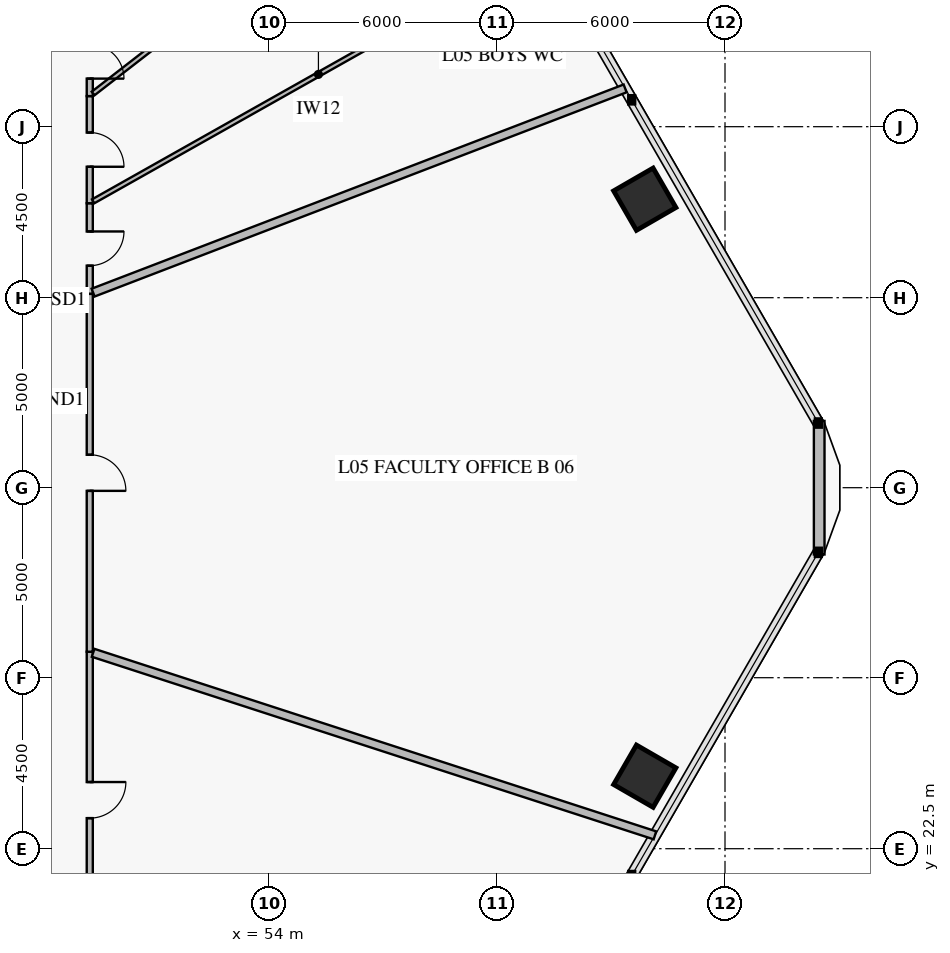
"""IFC4 building model, lengths in metres.
Left out: names, types, materials, properties, quantities, classifications, styles, units other than length and angle.
Written with IfcOpenShell. Run it as: python <this file> out.ifc"""

import sys

from ifc_helpers import new_model, si_unit, direction, frame, frame_2d, origin, origin_2d, place, context, subcontext, project, spatial, rectangle, extrude, element, fill, save


model = new_model("IFC4")
c1 = context("Model", 3, precision=1e-05, world=origin(), true_north=direction((0.0, 1.0)))
c2 = subcontext(c1, "Body", "Model", "MODEL_VIEW")
j1 = project(units=[si_unit("LENGTHUNIT", "METRE"), si_unit("PLANEANGLEUNIT", "RADIAN")], contexts=[c1])
p1 = place(None, origin())
s1 = spatial("IfcSite", under=j1, at=p1, CompositionType="ELEMENT")
p2 = place(p1, origin())
s2 = spatial("IfcBuilding", under=s1, at=p2, CompositionType="ELEMENT")
p3 = place(p2, frame((0.0, 0.0, 20.4)))
s3 = spatial("IfcBuildingStorey", under=s2, at=p3, CompositionType="ELEMENT", Elevation=20.4)
for number, where, z_axis, x_axis in (
    (1, (63.889, 39.592, 0.0), (0.0, 0.0, 1.0), (-0.5, 0.866, 0.0)),
    (2, (63.889, 24.408, 0.0), (0.0, 0.0, 1.0), (0.5, 0.866, 0.0)),
):
    element("IfcColumn", number, at=place(p3, frame(where, z_axis=z_axis, x_axis=x_axis)), inside=s3, PredefinedType="COLUMN", context=c2, shape_type="SweptSolid", body=[
        extrude(rectangle(XDim=1.2, YDim=1.2, at=origin_2d()), origin(), (0.0, 0.0, 1.0), 3.92),
    ])
p4 = place(p3, frame((68.479, 33.758, 0.0), z_axis=(0.0, 0.0, 1.0), x_axis=(0.0, -1.0, 0.0)))
e3 = element("IfcWall", 3, at=p4, inside=s3, PredefinedType="SOLIDWALL", context=c2, shape_type="SweptSolid", body=[
    extrude(rectangle(XDim=3.515, YDim=0.28, at=frame_2d((1.758, 0.0))), origin(), (0.0, 0.0, 1.0), 3.92),
])
p5 = place(p3, frame((49.285, 37.1, 0.0), z_axis=(0.0, 0.0, 1.0), x_axis=(0.0, 1.0, 0.0)))
e4 = element("IfcWall", 4, at=p5, inside=s3, PredefinedType="PARTITIONING", context=c2, shape_type="SweptSolid", body=[
    extrude(rectangle(XDim=2.386, YDim=0.16, at=frame_2d((1.193, 0.0))), origin(), (0.0, 0.0, 1.0), 3.92),
])
p6 = place(p5, frame((0.743, 0.0, 0.0)))
e5 = element("IfcOpeningElement", 5, at=p6, cuts=e4, PredefinedType="OPENING", context=c2, shape_type="SweptSolid", body=[
    extrude(rectangle(XDim=0.9, YDim=2.1, at=frame_2d((0.45, 1.05))), frame((0.0, 0.092, 0.0), z_axis=(0.0, -1.0, 0.0), x_axis=(1.0, 0.0, 0.0)), (0.0, 0.0, 1.0), 0.184),
])
p7 = place(p3, frame((49.285, 39.486, 0.0), z_axis=(0.0, 0.0, 1.0), x_axis=(0.0, 1.0, 0.0)))
e6 = element("IfcWall", 6, at=p7, inside=s3, PredefinedType="PARTITIONING", context=c2, shape_type="SweptSolid", body=[
    extrude(rectangle(XDim=2.819, YDim=0.16, at=frame_2d((1.41, 0.0))), origin(), (0.0, 0.0, 1.0), 3.92),
])
p8 = place(p7, frame((0.96, 0.0, 0.0)))
e7 = element("IfcOpeningElement", 7, at=p8, cuts=e6, PredefinedType="OPENING", context=c2, shape_type="SweptSolid", body=[
    extrude(rectangle(XDim=0.9, YDim=2.1, at=frame_2d((0.45, 1.05))), frame((0.0, 0.092, 0.0), z_axis=(0.0, -1.0, 0.0), x_axis=(1.0, 0.0, 0.0)), (0.0, 0.0, 1.0), 0.184),
])
p9 = place(p3, frame((49.285, 42.305, 0.0), z_axis=(0.0, 0.0, 1.0), x_axis=(0.0, 1.0, 0.0)))
e8 = element("IfcWall", 8, at=p9, inside=s3, PredefinedType="PARTITIONING", context=c2, shape_type="SweptSolid", body=[
    extrude(rectangle(XDim=1.82, YDim=0.16, at=frame_2d((0.91, 0.0))), origin(), (0.0, 0.0, 1.0), 3.92),
])
p10 = place(p9, frame((0.46, 0.0, 0.0)))
e9 = element("IfcOpeningElement", 9, at=p10, cuts=e8, PredefinedType="OPENING", context=c2, shape_type="SweptSolid", body=[
    extrude(rectangle(XDim=0.9, YDim=2.1, at=frame_2d((0.45, 1.05))), frame((0.0, 0.092, 0.0), z_axis=(0.0, -1.0, 0.0), x_axis=(1.0, 0.0, 0.0)), (0.0, 0.0, 1.0), 0.184),
])
p11 = place(p3, frame((49.285, 19.875, 0.0), z_axis=(0.0, 0.0, 1.0), x_axis=(0.0, 1.0, 0.0)))
e10 = element("IfcWall", 10, at=p11, inside=s3, PredefinedType="PARTITIONING", context=c2, shape_type="SweptSolid", body=[
    extrude(rectangle(XDim=7.808, YDim=0.16, at=frame_2d((3.904, 0.0))), origin(), (0.0, 0.0, 1.0), 3.92),
])
p12 = place(p11, frame((3.429, 0.0, 0.0)))
e11 = element("IfcOpeningElement", 11, at=p12, cuts=e10, PredefinedType="OPENING", context=c2, shape_type="SweptSolid", body=[
    extrude(rectangle(XDim=0.95, YDim=2.1, at=frame_2d((0.475, 1.05))), frame((0.0, 0.092, 0.0), z_axis=(0.0, -1.0, 0.0), x_axis=(1.0, 0.0, 0.0)), (0.0, 0.0, 1.0), 0.184),
])
p13 = place(p3, frame((49.285, 27.683, 0.0), z_axis=(0.0, 0.0, 1.0), x_axis=(0.0, 1.0, 0.0)))
e12 = element("IfcWall", 12, at=p13, inside=s3, PredefinedType="PARTITIONING", context=c2, shape_type="SweptSolid", body=[
    extrude(rectangle(XDim=9.416, YDim=0.16, at=frame_2d((4.708, 0.0))), origin(), (0.0, 0.0, 1.0), 3.22),
])
p14 = place(p13, frame((4.233, 0.0, 0.0)))
e13 = element("IfcOpeningElement", 13, at=p14, cuts=e12, PredefinedType="OPENING", context=c2, shape_type="SweptSolid", body=[
    extrude(rectangle(XDim=0.95, YDim=2.1, at=frame_2d((0.475, 1.05))), frame((0.0, 0.092, 0.0), z_axis=(0.0, -1.0, 0.0), x_axis=(1.0, 0.0, 0.0)), (0.0, 0.0, 1.0), 0.184),
])
p15 = place(p3, frame((49.373, 37.134, 0.0), z_axis=(0.0, 0.0, 1.0), x_axis=(0.933584586871, 0.358357111214, 0.0)))
e14 = element("IfcWall", 14, at=p15, inside=s3, PredefinedType="PARTITIONING", context=c2, shape_type="SweptSolid", body=[
    extrude(rectangle(XDim=14.995, YDim=0.22, at=frame_2d((7.498, 0.0))), origin(), (0.0, 0.0, 1.0), 3.17),
])
p16 = place(p3, frame((49.373, 39.535, 0.0), z_axis=(0.0, 0.0, 1.0), x_axis=(0.871218886354, 0.490894746417, 0.0)))
e15 = element("IfcWall", 15, at=p16, inside=s3, PredefinedType="PARTITIONING", context=c2, shape_type="SweptSolid", body=[
    extrude(rectangle(XDim=13.61, YDim=0.12, at=frame_2d((6.805, 0.0))), origin(), (0.0, 0.0, 1.0), 3.17),
])
p17 = place(p3, frame((49.373, 42.373, 0.0), z_axis=(0.0, 0.0, 1.0), x_axis=(0.790162754328, 0.612897072658, 0.0)))
e16 = element("IfcWall", 16, at=p17, inside=s3, PredefinedType="PARTITIONING", context=c2, shape_type="SweptSolid", body=[
    extrude(rectangle(XDim=4.991, YDim=0.12, at=frame_2d((2.496, 0.0))), origin(), (0.0, 0.0, 1.0), 3.47),
])
p18 = place(p3, frame((49.373, 27.655, 0.0), z_axis=(0.0, 0.0, 1.0), x_axis=(0.951055880984, -0.309018949654, 0.0)))
e17 = element("IfcWall", 17, at=p18, inside=s3, PredefinedType="PARTITIONING", context=c2, shape_type="SweptSolid", body=[
    extrude(rectangle(XDim=15.544, YDim=0.22, at=frame_2d((7.772, 0.0))), origin(), (0.0, 0.0, 1.0), 3.17),
])
p19 = place(p6, frame((0.9, 0.0, 0.0), z_axis=(0.0, 0.0, 1.0), x_axis=(-1.0, 0.0, 0.0)))
e18 = element("IfcDoor", 18, at=p19, inside=s3, OperationType="SINGLE_SWING_LEFT", PredefinedType="DOOR", context=c2, shape_type="SweptSolid", body=[
    extrude(rectangle(XDim=0.9, YDim=2.1, at=frame_2d((0.45, 1.05))), frame((0.0, 0.025, 0.0), z_axis=(0.0, -1.0, 0.0), x_axis=(1.0, 0.0, 0.0)), (0.0, 0.0, 1.0), 0.05),
])
fill(e5, e18)
p20 = place(p8, frame((0.9, 0.0, 0.0), z_axis=(0.0, 0.0, 1.0), x_axis=(-1.0, 0.0, 0.0)))
e19 = element("IfcDoor", 19, at=p20, inside=s3, OperationType="SINGLE_SWING_RIGHT", PredefinedType="DOOR", context=c2, shape_type="SweptSolid", body=[
    extrude(rectangle(XDim=0.9, YDim=2.1, at=frame_2d((0.45, 1.05))), frame((0.0, 0.025, 0.0), z_axis=(0.0, -1.0, 0.0), x_axis=(1.0, 0.0, 0.0)), (0.0, 0.0, 1.0), 0.05),
])
fill(e7, e19)
p21 = place(p10, frame((0.9, 0.0, 0.0), z_axis=(0.0, 0.0, 1.0), x_axis=(-1.0, 0.0, 0.0)))
e20 = element("IfcDoor", 20, at=p21, inside=s3, OperationType="SINGLE_SWING_RIGHT", PredefinedType="DOOR", context=c2, shape_type="SweptSolid", body=[
    extrude(rectangle(XDim=0.9, YDim=2.1, at=frame_2d((0.45, 1.05))), frame((0.0, 0.025, 0.0), z_axis=(0.0, -1.0, 0.0), x_axis=(1.0, 0.0, 0.0)), (0.0, 0.0, 1.0), 0.05),
])
fill(e9, e20)
p22 = place(p12, frame((0.95, 0.0, 0.0), z_axis=(0.0, 0.0, 1.0), x_axis=(-1.0, 0.0, 0.0)))
e21 = element("IfcDoor", 21, at=p22, inside=s3, OperationType="SINGLE_SWING_LEFT", PredefinedType="DOOR", context=c2, shape_type="SweptSolid", body=[
    extrude(rectangle(XDim=0.95, YDim=2.1, at=frame_2d((0.475, 1.05))), frame((0.0, 0.025, 0.0), z_axis=(0.0, -1.0, 0.0), x_axis=(1.0, 0.0, 0.0)), (0.0, 0.0, 1.0), 0.05),
])
fill(e11, e21)
p23 = place(p14, frame((0.95, 0.0, 0.0), z_axis=(0.0, 0.0, 1.0), x_axis=(-1.0, 0.0, 0.0)))
e22 = element("IfcDoor", 22, at=p23, inside=s3, OperationType="SINGLE_SWING_RIGHT", PredefinedType="DOOR", context=c2, shape_type="SweptSolid", body=[
    extrude(rectangle(XDim=0.95, YDim=2.1, at=frame_2d((0.475, 1.05))), frame((0.0, 0.025, 0.0), z_axis=(0.0, -1.0, 0.0), x_axis=(1.0, 0.0, 0.0)), (0.0, 0.0, 1.0), 0.05),
])
fill(e13, e22)
save(model, sys.argv[1])
